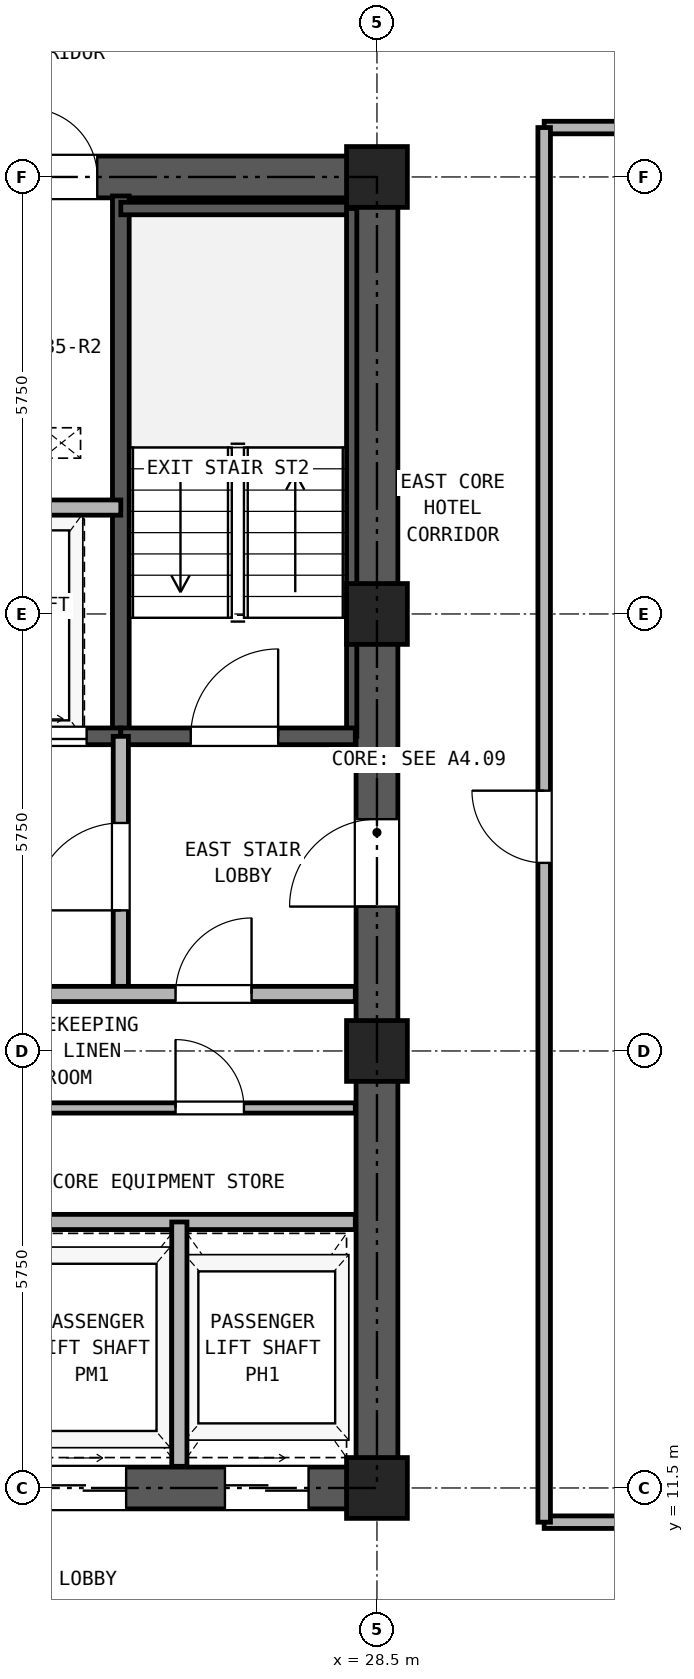
"""IFC4 building model, lengths in metres.
Left out: names, types, materials, properties, quantities, classifications, styles, units other than length and angle.
Written with IfcOpenShell. Run it as: python <this file> out.ifc"""

import sys

from ifc_helpers import new_model, si_unit, direction, frame, frame_2d, origin, origin_2d, place, context, subcontext, project, spatial, rectangle, hollow_rectangle, extrude, source, transform, mapped, element, fill, save


model = new_model("IFC4")
c1 = context("Model", 3, precision=1e-05, world=origin(), true_north=direction((0.0, 1.0)))
c2 = subcontext(c1, "Body", "Model", "MODEL_VIEW")
j1 = project(units=[si_unit("LENGTHUNIT", "METRE"), si_unit("PLANEANGLEUNIT", "RADIAN")], contexts=[c1])
p1 = place(None, origin())
s1 = spatial("IfcSite", under=j1, at=p1, CompositionType="ELEMENT")
p2 = place(p1, origin())
s2 = spatial("IfcBuilding", under=s1, at=p2, CompositionType="ELEMENT")
p3 = place(p2, frame((0.0, 0.0, 127.9)))
s3 = spatial("IfcBuildingStorey", under=s2, at=p3, CompositionType="ELEMENT", Elevation=127.9)
m1 = source(origin(), c2, "Body", "SweptSolid", [
    extrude(hollow_rectangle(XDim=0.8, YDim=0.8, WallThickness=0.045, at=origin_2d()), origin(), (0.0, 0.0, 1.0), 2.95),
])
for number, where, z_axis, x_axis in (
    (1, (28.5, 11.5, 0.0), (0.0, 0.0, 1.0), (1.0, 0.0, 0.0)),
    (2, (28.5, 17.25, 0.0), (0.0, 0.0, 1.0), (1.0, 0.0, 0.0)),
    (3, (28.5, 23.0, 0.0), (0.0, 0.0, 1.0), (1.0, 0.0, 0.0)),
    (4, (28.5, 28.75, 0.0), (0.0, 0.0, 1.0), (1.0, 0.0, 0.0)),
):
    element("IfcColumn", number, at=place(p3, frame(where, z_axis=z_axis, x_axis=x_axis)), inside=s3, PredefinedType="COLUMN", context=c2, shape_type="MappedRepresentation", body=[
        mapped(m1, transform((0.0, 0.0, 0.0), x_axis=(1.0, 0.0, 0.0), y_axis=(0.0, 1.0, 0.0), z_axis=(0.0, 0.0, 1.0), scale=1.0)),
    ])
p4 = place(p3, frame((18.225, 11.5, 0.0), z_axis=(0.0, 0.0, 1.0), x_axis=(1.0, 0.0, 0.0)))
e5 = element("IfcWall", 5, at=p4, inside=s3, PredefinedType="SHEAR", context=c2, shape_type="SweptSolid", body=[
    extrude(rectangle(XDim=10.55, YDim=0.55, at=frame_2d((5.275, 0.0))), origin(), (0.0, 0.0, 1.0), 2.95),
])
p5 = place(p4, frame((2.375, 0.0, 0.0)))
e6 = element("IfcOpeningElement", 6, at=p5, cuts=e5, PredefinedType="OPENING", context=c2, shape_type="SweptSolid", body=[
    extrude(rectangle(XDim=0.95, YDim=2.15, at=frame_2d((0.475, 1.075))), frame((0.0, 0.285, 0.0), z_axis=(0.0, -1.0, 0.0), x_axis=(1.0, 0.0, 0.0)), (0.0, 0.0, 1.0), 0.57),
])
p6 = place(p4, frame((5.875, 0.0, 0.0)))
e7 = element("IfcOpeningElement", 7, at=p6, cuts=e5, PredefinedType="OPENING", context=c2, shape_type="SweptSolid", body=[
    extrude(rectangle(XDim=1.1, YDim=2.25, at=frame_2d((0.55, 1.125))), frame((0.0, 0.285, 0.0), z_axis=(0.0, -1.0, 0.0), x_axis=(1.0, 0.0, 0.0)), (0.0, 0.0, 1.0), 0.57),
])
p7 = place(p4, frame((8.275, 0.0, 0.0)))
e8 = element("IfcOpeningElement", 8, at=p7, cuts=e5, PredefinedType="OPENING", context=c2, shape_type="SweptSolid", body=[
    extrude(rectangle(XDim=1.1, YDim=2.25, at=frame_2d((0.55, 1.125))), frame((0.0, 0.285, 0.0), z_axis=(0.0, -1.0, 0.0), x_axis=(1.0, 0.0, 0.0)), (0.0, 0.0, 1.0), 0.57),
])
p8 = place(p3, frame((18.225, 28.75, 0.0), z_axis=(0.0, 0.0, 1.0), x_axis=(1.0, 0.0, 0.0)))
e9 = element("IfcWall", 9, at=p8, inside=s3, PredefinedType="SHEAR", context=c2, shape_type="SweptSolid", body=[
    extrude(rectangle(XDim=10.55, YDim=0.55, at=frame_2d((5.275, 0.0))), origin(), (0.0, 0.0, 1.0), 2.95),
])
p9 = place(p8, frame((4.155, 0.0, 0.0)))
e10 = element("IfcOpeningElement", 10, at=p9, cuts=e9, PredefinedType="OPENING", context=c2, shape_type="SweptSolid", body=[
    extrude(rectangle(XDim=0.9, YDim=2.05, at=frame_2d((0.45, 1.025))), frame((0.0, 0.285, 0.0), z_axis=(0.0, -1.0, 0.0), x_axis=(1.0, 0.0, 0.0)), (0.0, 0.0, 1.0), 0.57),
])
p10 = place(p8, frame((5.695, 0.0, 0.0)))
e11 = element("IfcOpeningElement", 11, at=p10, cuts=e9, PredefinedType="OPENING", context=c2, shape_type="SweptSolid", body=[
    extrude(rectangle(XDim=0.9, YDim=2.05, at=frame_2d((0.45, 1.025))), frame((0.0, 0.285, 0.0), z_axis=(0.0, -1.0, 0.0), x_axis=(1.0, 0.0, 0.0)), (0.0, 0.0, 1.0), 0.57),
])
p11 = place(p3, frame((28.5, 11.775, 0.0), z_axis=(0.0, 0.0, 1.0), x_axis=(0.0, 1.0, 0.0)))
e12 = element("IfcWall", 12, at=p11, inside=s3, PredefinedType="SHEAR", context=c2, shape_type="SweptSolid", body=[
    extrude(rectangle(XDim=16.7, YDim=0.55, at=frame_2d((8.35, 0.0))), origin(), (0.0, 0.0, 1.0), 2.95),
])
p12 = place(p11, frame((7.375, 0.0, 0.0)))
e13 = element("IfcOpeningElement", 13, at=p12, cuts=e12, PredefinedType="OPENING", context=c2, shape_type="SweptSolid", body=[
    extrude(rectangle(XDim=1.15, YDim=2.2, at=frame_2d((0.575, 1.1))), frame((0.0, 0.285, 0.0), z_axis=(0.0, -1.0, 0.0), x_axis=(1.0, 0.0, 0.0)), (0.0, 0.0, 1.0), 0.57),
])
p13 = place(p3, frame((25.13, 21.39, 0.0), z_axis=(0.0, 0.0, 1.0), x_axis=(0.0, 1.0, 0.0)))
e14 = element("IfcWall", 14, at=p13, inside=s3, PredefinedType="SOLIDWALL", context=c2, shape_type="SweptSolid", body=[
    extrude(rectangle(XDim=7.11, YDim=0.22, at=frame_2d((3.555, 0.0))), origin(), (0.0, 0.0, 1.0), 2.95),
])
p14 = place(p3, frame((25.13, 28.335, 0.0), z_axis=(0.0, 0.0, 1.0), x_axis=(1.0, 0.0, 0.0)))
e15 = element("IfcWall", 15, at=p14, inside=s3, PredefinedType="PARTITIONING", context=c2, shape_type="SweptSolid", body=[
    extrude(rectangle(XDim=3.085, YDim=0.165, at=frame_2d((1.542, 0.0))), origin(), (0.0, 0.0, 1.0), 2.95),
])
p15 = place(p3, frame((28.167, 21.39, 0.0), z_axis=(0.0, 0.0, 1.0), x_axis=(0.0, 1.0, 0.0)))
e16 = element("IfcWall", 16, at=p15, inside=s3, PredefinedType="PARTITIONING", context=c2, shape_type="SweptSolid", body=[
    extrude(rectangle(XDim=6.945, YDim=0.135, at=frame_2d((3.473, 0.0))), origin(), (0.0, 0.0, 1.0), 2.95),
])
p16 = place(p3, frame((18.785, 21.39, 0.0), z_axis=(0.0, 0.0, 1.0), x_axis=(1.0, 0.0, 0.0)))
e17 = element("IfcWall", 17, at=p16, inside=s3, PredefinedType="SOLIDWALL", context=c2, shape_type="SweptSolid", body=[
    extrude(rectangle(XDim=6.345, YDim=0.22, at=frame_2d((3.172, 0.0))), origin(), (0.0, 0.0, 1.0), 2.95),
])
p17 = place(p16, frame((1.065, 0.0, 0.0)))
e18 = element("IfcOpeningElement", 18, at=p17, cuts=e17, PredefinedType="OPENING", context=c2, shape_type="SweptSolid", body=[
    extrude(rectangle(XDim=1.15, YDim=2.2, at=frame_2d((0.575, 1.1))), frame((0.0, 0.12, 0.0), z_axis=(0.0, -1.0, 0.0), x_axis=(1.0, 0.0, 0.0)), (0.0, 0.0, 1.0), 0.24),
])
p18 = place(p16, frame((4.795, 0.0, 0.0)))
e19 = element("IfcOpeningElement", 19, at=p18, cuts=e17, PredefinedType="OPENING", context=c2, shape_type="SweptSolid", body=[
    extrude(rectangle(XDim=1.1, YDim=2.25, at=frame_2d((0.55, 1.125))), frame((0.0, 0.12, 0.0), z_axis=(0.0, -1.0, 0.0), x_axis=(1.0, 0.0, 0.0)), (0.0, 0.0, 1.0), 0.24),
])
p19 = place(p3, frame((25.13, 21.39, 0.0), z_axis=(0.0, 0.0, 1.0), x_axis=(1.0, 0.0, 0.0)))
e20 = element("IfcWall", 20, at=p19, inside=s3, PredefinedType="SOLIDWALL", context=c2, shape_type="SweptSolid", body=[
    extrude(rectangle(XDim=3.085, YDim=0.22, at=frame_2d((1.542, 0.0))), origin(), (0.0, 0.0, 1.0), 2.95),
])
p20 = place(p19, frame((0.92, 0.0, 0.0)))
e21 = element("IfcOpeningElement", 21, at=p20, cuts=e20, PredefinedType="OPENING", context=c2, shape_type="SweptSolid", body=[
    extrude(rectangle(XDim=1.15, YDim=2.2, at=frame_2d((0.575, 1.1))), frame((0.0, 0.12, 0.0), z_axis=(0.0, -1.0, 0.0), x_axis=(1.0, 0.0, 0.0)), (0.0, 0.0, 1.0), 0.24),
])
p21 = place(p3, frame((22.11, 24.4, 0.0), z_axis=(0.0, 0.0, 1.0), x_axis=(1.0, 0.0, 0.0)))
e22 = element("IfcWall", 22, at=p21, inside=s3, PredefinedType="PARTITIONING", context=c2, shape_type="SweptSolid", body=[
    extrude(rectangle(XDim=3.02, YDim=0.2, at=frame_2d((1.51, 0.0))), origin(), (0.0, 0.0, 1.0), 2.95),
])
p22 = place(p3, frame((25.13, 18.0, 0.0), z_axis=(0.0, 0.0, 1.0), x_axis=(0.0, 1.0, 0.0)))
e23 = element("IfcWall", 23, at=p22, inside=s3, PredefinedType="PARTITIONING", context=c2, shape_type="SweptSolid", body=[
    extrude(rectangle(XDim=3.39, YDim=0.2, at=frame_2d((1.695, 0.0))), origin(), (0.0, 0.0, 1.0), 2.95),
])
p23 = place(p22, frame((1.1, 0.0, 0.0)))
e24 = element("IfcOpeningElement", 24, at=p23, cuts=e23, PredefinedType="OPENING", context=c2, shape_type="SweptSolid", body=[
    extrude(rectangle(XDim=1.15, YDim=2.2, at=frame_2d((0.575, 1.1))), frame((0.0, 0.11, 0.0), z_axis=(0.0, -1.0, 0.0), x_axis=(1.0, 0.0, 0.0)), (0.0, 0.0, 1.0), 0.22),
])
p24 = place(p3, frame((18.785, 18.0, 0.0), z_axis=(0.0, 0.0, 1.0), x_axis=(1.0, 0.0, 0.0)))
e25 = element("IfcWall", 25, at=p24, inside=s3, PredefinedType="PARTITIONING", context=c2, shape_type="SweptSolid", body=[
    extrude(rectangle(XDim=9.43, YDim=0.2, at=frame_2d((4.715, 0.0))), origin(), (0.0, 0.0, 1.0), 2.95),
])
p25 = place(p24, frame((0.465, 0.0, 0.0)))
e26 = element("IfcOpeningElement", 26, at=p25, cuts=e25, PredefinedType="OPENING", context=c2, shape_type="SweptSolid", body=[
    extrude(rectangle(XDim=1.3, YDim=2.3, at=frame_2d((0.65, 1.15))), frame((0.0, 0.11, 0.0), z_axis=(0.0, -1.0, 0.0), x_axis=(1.0, 0.0, 0.0)), (0.0, 0.0, 1.0), 0.22),
])
p26 = place(p24, frame((2.565, 0.0, 0.0)))
e27 = element("IfcOpeningElement", 27, at=p26, cuts=e25, PredefinedType="OPENING", context=c2, shape_type="SweptSolid", body=[
    extrude(rectangle(XDim=1.3, YDim=2.3, at=frame_2d((0.65, 1.15))), frame((0.0, 0.11, 0.0), z_axis=(0.0, -1.0, 0.0), x_axis=(1.0, 0.0, 0.0)), (0.0, 0.0, 1.0), 0.22),
])
p27 = place(p24, frame((7.065, 0.0, 0.0)))
e28 = element("IfcOpeningElement", 28, at=p27, cuts=e25, PredefinedType="OPENING", context=c2, shape_type="SweptSolid", body=[
    extrude(rectangle(XDim=1.0, YDim=2.15, at=frame_2d((0.5, 1.075))), frame((0.0, 0.11, 0.0), z_axis=(0.0, -1.0, 0.0), x_axis=(1.0, 0.0, 0.0)), (0.0, 0.0, 1.0), 0.22),
])
p28 = place(p3, frame((18.785, 15.0, 0.0), z_axis=(0.0, 0.0, 1.0), x_axis=(1.0, 0.0, 0.0)))
e29 = element("IfcWall", 29, at=p28, inside=s3, PredefinedType="PARTITIONING", context=c2, shape_type="SweptSolid", body=[
    extrude(rectangle(XDim=9.43, YDim=0.2, at=frame_2d((4.715, 0.0))), origin(), (0.0, 0.0, 1.0), 2.95),
])
p29 = place(p3, frame((23.3, 16.5, 0.0), z_axis=(0.0, 0.0, 1.0), x_axis=(1.0, 0.0, 0.0)))
e30 = element("IfcWall", 30, at=p29, inside=s3, PredefinedType="PARTITIONING", context=c2, shape_type="SweptSolid", body=[
    extrude(rectangle(XDim=4.915, YDim=0.135, at=frame_2d((2.458, 0.0))), origin(), (0.0, 0.0, 1.0), 2.95),
])
p30 = place(p29, frame((2.55, 0.0, 0.0)))
e31 = element("IfcOpeningElement", 31, at=p30, cuts=e30, PredefinedType="OPENING", context=c2, shape_type="SweptSolid", body=[
    extrude(rectangle(XDim=0.9, YDim=2.05, at=frame_2d((0.45, 1.025))), frame((0.0, 0.077, 0.0), z_axis=(0.0, -1.0, 0.0), x_axis=(1.0, 0.0, 0.0)), (0.0, 0.0, 1.0), 0.155),
])
p31 = place(p3, frame((25.9, 11.785, 0.0), z_axis=(0.0, 0.0, 1.0), x_axis=(0.0, 1.0, 0.0)))
e32 = element("IfcWall", 32, at=p31, inside=s3, PredefinedType="PARTITIONING", context=c2, shape_type="SweptSolid", body=[
    extrude(rectangle(XDim=3.215, YDim=0.2, at=frame_2d((1.607, 0.0))), origin(), (0.0, 0.0, 1.0), 2.95),
])
for number, where, z_axis, x_axis in (
    (33, (30.7, 11.05, 0.0), (0.0, 0.0, 1.0), (1.0, 0.0, 0.0)),
    (34, (30.7, 29.4, 0.0), (0.0, 0.0, 1.0), (1.0, 0.0, 0.0)),
):
    element("IfcWall", number, at=place(p3, frame(where, z_axis=z_axis, x_axis=x_axis)), inside=s3, PredefinedType="PARTITIONING", context=c2, shape_type="SweptSolid", body=[
        extrude(rectangle(XDim=6.7, YDim=0.165, at=frame_2d((3.35, 0.0))), origin(), (0.0, 0.0, 1.0), 2.95),
    ])
p32 = place(p3, frame((30.7, 11.05, 0.0), z_axis=(0.0, 0.0, 1.0), x_axis=(0.0, 1.0, 0.0)))
e35 = element("IfcWall", 35, at=p32, inside=s3, PredefinedType="PARTITIONING", context=c2, shape_type="SweptSolid", body=[
    extrude(rectangle(XDim=18.35, YDim=0.165, at=frame_2d((9.175, 0.0))), origin(), (0.0, 0.0, 1.0), 2.95),
])
p33 = place(p32, frame((8.675, 0.0, 0.0)))
e36 = element("IfcOpeningElement", 36, at=p33, cuts=e35, PredefinedType="OPENING", context=c2, shape_type="SweptSolid", body=[
    extrude(rectangle(XDim=0.95, YDim=2.15, at=frame_2d((0.475, 1.075))), frame((0.0, 0.093, 0.0), z_axis=(0.0, -1.0, 0.0), x_axis=(1.0, 0.0, 0.0)), (0.0, 0.0, 1.0), 0.185),
])
p34 = place(p20, frame((1.15, 0.0, 0.0), z_axis=(0.0, 0.0, 1.0), x_axis=(-1.0, 0.0, 0.0)))
e37 = element("IfcDoor", 37, at=p34, inside=s3, OperationType="SINGLE_SWING_RIGHT", PredefinedType="DOOR", context=c2, shape_type="SweptSolid", body=[
    extrude(rectangle(XDim=1.15, YDim=2.2, at=frame_2d((0.575, 1.1))), frame((0.0, 0.025, 0.0), z_axis=(0.0, -1.0, 0.0), x_axis=(1.0, 0.0, 0.0)), (0.0, 0.0, 1.0), 0.05),
])
fill(e21, e37)
p35 = place(p18, frame((1.1, 0.0, 0.0), z_axis=(0.0, 0.0, 1.0), x_axis=(-1.0, 0.0, 0.0)))
e38 = element("IfcDoor", 38, at=p35, inside=s3, OperationType="DOUBLE_DOOR_SLIDING", PredefinedType="DOOR", context=c2, shape_type="SweptSolid", body=[
    extrude(rectangle(XDim=1.1, YDim=2.25, at=frame_2d((0.55, 1.125))), frame((0.0, 0.025, 0.0), z_axis=(0.0, -1.0, 0.0), x_axis=(1.0, 0.0, 0.0)), (0.0, 0.0, 1.0), 0.05),
])
fill(e19, e38)
p36 = place(p23, origin())
e39 = element("IfcDoor", 39, at=p36, inside=s3, OperationType="SINGLE_SWING_LEFT", PredefinedType="DOOR", context=c2, shape_type="SweptSolid", body=[
    extrude(rectangle(XDim=1.15, YDim=2.2, at=frame_2d((0.575, 1.1))), frame((0.0, 0.025, 0.0), z_axis=(0.0, -1.0, 0.0), x_axis=(1.0, 0.0, 0.0)), (0.0, 0.0, 1.0), 0.05),
])
fill(e24, e39)
p37 = place(p27, frame((1.0, 0.0, 0.0), z_axis=(0.0, 0.0, 1.0), x_axis=(-1.0, 0.0, 0.0)))
e40 = element("IfcDoor", 40, at=p37, inside=s3, OperationType="SINGLE_SWING_RIGHT", PredefinedType="DOOR", context=c2, shape_type="SweptSolid", body=[
    extrude(rectangle(XDim=1.0, YDim=2.15, at=frame_2d((0.5, 1.075))), frame((0.0, 0.025, 0.0), z_axis=(0.0, -1.0, 0.0), x_axis=(1.0, 0.0, 0.0)), (0.0, 0.0, 1.0), 0.05),
])
fill(e28, e40)
p38 = place(p30, frame((0.9, 0.0, 0.0), z_axis=(0.0, 0.0, 1.0), x_axis=(-1.0, 0.0, 0.0)))
e41 = element("IfcDoor", 41, at=p38, inside=s3, OperationType="SINGLE_SWING_LEFT", PredefinedType="DOOR", context=c2, shape_type="SweptSolid", body=[
    extrude(rectangle(XDim=0.9, YDim=2.05, at=frame_2d((0.45, 1.025))), frame((0.0, 0.025, 0.0), z_axis=(0.0, -1.0, 0.0), x_axis=(1.0, 0.0, 0.0)), (0.0, 0.0, 1.0), 0.05),
])
fill(e31, e41)
p39 = place(p12, origin())
e42 = element("IfcDoor", 42, at=p39, inside=s3, OperationType="SINGLE_SWING_LEFT", PredefinedType="DOOR", context=c2, shape_type="SweptSolid", body=[
    extrude(rectangle(XDim=1.15, YDim=2.2, at=frame_2d((0.575, 1.1))), frame((0.0, 0.025, 0.0), z_axis=(0.0, -1.0, 0.0), x_axis=(1.0, 0.0, 0.0)), (0.0, 0.0, 1.0), 0.05),
])
fill(e13, e42)
p40 = place(p10, origin())
e43 = element("IfcDoor", 43, at=p40, inside=s3, OperationType="SINGLE_SWING_LEFT", PredefinedType="DOOR", context=c2, shape_type="SweptSolid", body=[
    extrude(rectangle(XDim=0.9, YDim=2.05, at=frame_2d((0.45, 1.025))), frame((0.0, 0.025, 0.0), z_axis=(0.0, -1.0, 0.0), x_axis=(1.0, 0.0, 0.0)), (0.0, 0.0, 1.0), 0.05),
])
fill(e11, e43)
p41 = place(p6, frame((1.1, 0.0, 0.0), z_axis=(0.0, 0.0, 1.0), x_axis=(-1.0, 0.0, 0.0)))
e44 = element("IfcDoor", 44, at=p41, inside=s3, OperationType="DOUBLE_DOOR_SLIDING", PredefinedType="DOOR", context=c2, shape_type="SweptSolid", body=[
    extrude(rectangle(XDim=1.1, YDim=2.25, at=frame_2d((0.55, 1.125))), frame((0.0, 0.025, 0.0), z_axis=(0.0, -1.0, 0.0), x_axis=(1.0, 0.0, 0.0)), (0.0, 0.0, 1.0), 0.05),
])
fill(e7, e44)
p42 = place(p7, frame((1.1, 0.0, 0.0), z_axis=(0.0, 0.0, 1.0), x_axis=(-1.0, 0.0, 0.0)))
e45 = element("IfcDoor", 45, at=p42, inside=s3, OperationType="DOUBLE_DOOR_SLIDING", PredefinedType="DOOR", context=c2, shape_type="SweptSolid", body=[
    extrude(rectangle(XDim=1.1, YDim=2.25, at=frame_2d((0.55, 1.125))), frame((0.0, 0.025, 0.0), z_axis=(0.0, -1.0, 0.0), x_axis=(1.0, 0.0, 0.0)), (0.0, 0.0, 1.0), 0.05),
])
fill(e8, e45)
p43 = place(p33, origin())
e46 = element("IfcDoor", 46, at=p43, inside=s3, OperationType="SINGLE_SWING_RIGHT", PredefinedType="DOOR", context=c2, shape_type="SweptSolid", body=[
    extrude(rectangle(XDim=0.95, YDim=2.15, at=frame_2d((0.475, 1.075))), frame((0.0, 0.025, 0.0), z_axis=(0.0, -1.0, 0.0), x_axis=(1.0, 0.0, 0.0)), (0.0, 0.0, 1.0), 0.05),
])
fill(e36, e46)
save(model, sys.argv[1])
